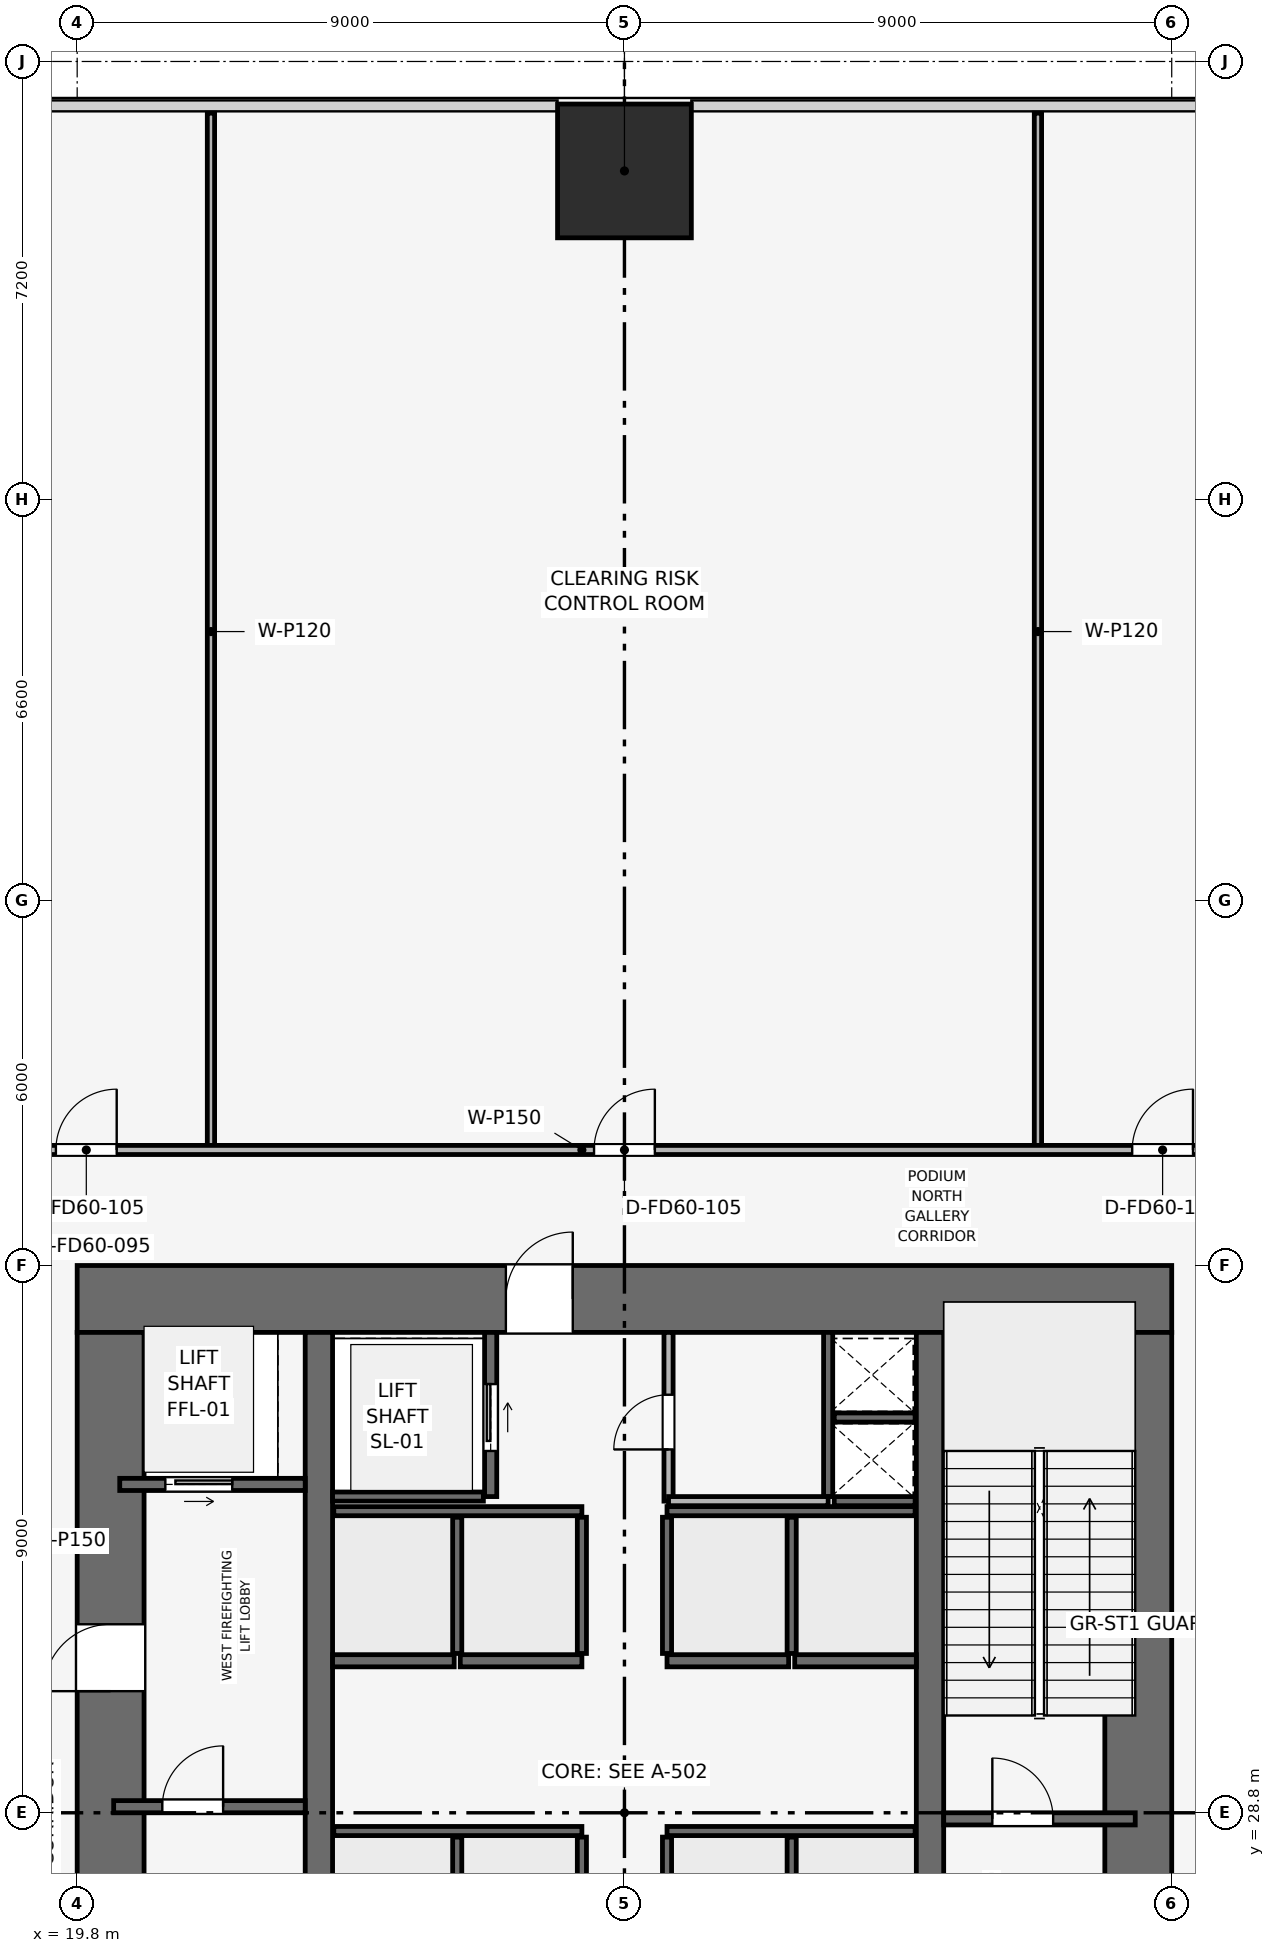
"""IFC4 building model, lengths in metres.
Left out: names, types, materials, properties, quantities, classifications, styles, units other than length and angle.
Written with IfcOpenShell. Run it as: python <this file> out.ifc"""

import sys

from ifc_helpers import new_model, si_unit, direction, frame, frame_2d, origin, origin_2d, place, context, subcontext, project, spatial, rectangle, extrude, element, fill, save


model = new_model("IFC4")
c1 = context("Model", 3, precision=1e-05, world=origin(), true_north=direction((0.0, 1.0)))
c2 = subcontext(c1, "Body", "Model", "MODEL_VIEW")
j1 = project(units=[si_unit("LENGTHUNIT", "METRE"), si_unit("PLANEANGLEUNIT", "RADIAN")], contexts=[c1])
p1 = place(None, origin())
s1 = spatial("IfcSite", under=j1, at=p1, CompositionType="ELEMENT")
p2 = place(p1, origin())
s2 = spatial("IfcBuilding", under=s1, at=p2, CompositionType="ELEMENT")
p3 = place(p2, frame((0.0, 0.0, 8.4)))
s3 = spatial("IfcBuildingStorey", under=s2, at=p3, CompositionType="ELEMENT", Elevation=8.4)
p4 = place(p3, frame((19.8, 37.25, 0.0), z_axis=(0.0, 0.0, 1.0), x_axis=(1.0, 0.0, 0.0)))
e1 = element("IfcWall", 1, at=p4, inside=s3, PredefinedType="SHEAR", context=c2, shape_type="SweptSolid", body=[
    extrude(rectangle(XDim=18.0, YDim=1.1, at=frame_2d((9.0, 0.0))), origin(), (0.0, 0.0, 1.0), 5.4),
])
p5 = place(p4, frame((7.05, 0.0, 0.0)))
e2 = element("IfcOpeningElement", 2, at=p5, cuts=e1, PredefinedType="OPENING", context=c2, shape_type="SweptSolid", body=[
    extrude(rectangle(XDim=1.1, YDim=2.15, at=frame_2d((0.55, 1.075))), frame((0.0, 0.56, 0.0), z_axis=(0.0, -1.0, 0.0), x_axis=(1.0, 0.0, 0.0)), (0.0, 0.0, 1.0), 1.12),
])
p6 = place(p3, frame((20.35, 20.9, 0.0), z_axis=(0.0, 0.0, 1.0), x_axis=(0.0, 1.0, 0.0)))
e3 = element("IfcWall", 3, at=p6, inside=s3, PredefinedType="SHEAR", context=c2, shape_type="SweptSolid", body=[
    extrude(rectangle(XDim=15.8, YDim=1.1, at=frame_2d((7.9, 0.0))), origin(), (0.0, 0.0, 1.0), 5.4),
])
p7 = place(p6, frame((9.9, 0.0, 0.0)))
e4 = element("IfcOpeningElement", 4, at=p7, cuts=e3, PredefinedType="OPENING", context=c2, shape_type="SweptSolid", body=[
    extrude(rectangle(XDim=1.1, YDim=2.15, at=frame_2d((0.55, 1.075))), frame((0.0, 0.56, 0.0), z_axis=(0.0, -1.0, 0.0), x_axis=(1.0, 0.0, 0.0)), (0.0, 0.0, 1.0), 1.12),
])
p8 = place(p3, frame((37.25, 20.9, 0.0), z_axis=(0.0, 0.0, 1.0), x_axis=(0.0, 1.0, 0.0)))
e5 = element("IfcWall", 5, at=p8, inside=s3, PredefinedType="SHEAR", context=c2, shape_type="SweptSolid", body=[
    extrude(rectangle(XDim=15.8, YDim=1.1, at=frame_2d((7.9, 0.0))), origin(), (0.0, 0.0, 1.0), 5.4),
])
p9 = place(p8, frame((4.4, 0.0, 0.0)))
e6 = element("IfcOpeningElement", 6, at=p9, cuts=e5, PredefinedType="OPENING", context=c2, shape_type="SweptSolid", body=[
    extrude(rectangle(XDim=1.1, YDim=2.15, at=frame_2d((0.55, 1.075))), frame((0.0, 0.56, 0.0), z_axis=(0.0, -1.0, 0.0), x_axis=(1.0, 0.0, 0.0)), (0.0, 0.0, 1.0), 1.12),
])
for number, where, z_axis, x_axis in (
    (7, (23.775, 20.9, 0.0), (0.0, 0.0, 1.0), (0.0, 1.0, 0.0)),
    (8, (33.825, 20.9, 0.0), (0.0, 0.0, 1.0), (0.0, 1.0, 0.0)),
):
    element("IfcWall", number, at=place(p3, frame(where, z_axis=z_axis, x_axis=x_axis)), inside=s3, PredefinedType="SHEAR", context=c2, shape_type="SweptSolid", body=[
        extrude(rectangle(XDim=15.8, YDim=0.45, at=frame_2d((7.9, 0.0))), origin(), (0.0, 0.0, 1.0), 5.4),
    ])
p10 = place(p3, frame((28.8, 55.8, 0.002), z_axis=(0.0, 0.0, 1.0), x_axis=(1.0, 0.0, 0.0)))
e9 = element("IfcColumn", 9, at=p10, inside=s3, PredefinedType="PILASTER", context=c2, shape_type="SweptSolid", body=[
    extrude(rectangle(XDim=2.2, YDim=2.2, at=origin_2d()), origin(), (0.0, 0.0, 1.0), 5.396),
])
p11 = place(p3, frame((20.4, 28.9, 0.0), z_axis=(0.0, 0.0, 1.0), x_axis=(1.0, 0.0, 0.0)))
e10 = element("IfcWall", 10, at=p11, inside=s3, PredefinedType="SHEAR", context=c2, shape_type="SweptSolid", body=[
    extrude(rectangle(XDim=3.15, YDim=0.2, at=frame_2d((1.575, 0.0))), origin(), (0.0, 0.0, 1.0), 5.05),
])
p12 = place(p11, frame((0.8, 0.0, 0.0)))
e11 = element("IfcOpeningElement", 11, at=p12, cuts=e10, PredefinedType="OPENING", context=c2, shape_type="SweptSolid", body=[
    extrude(rectangle(XDim=1.0, YDim=2.1, at=frame_2d((0.5, 1.05))), frame((0.0, 0.11, 0.0), z_axis=(0.0, -1.0, 0.0), x_axis=(1.0, 0.0, 0.0)), (0.0, 0.0, 1.0), 0.22),
])
p13 = place(p3, frame((34.05, 28.7, 0.0), z_axis=(0.0, 0.0, 1.0), x_axis=(1.0, 0.0, 0.0)))
e12 = element("IfcWall", 12, at=p13, inside=s3, PredefinedType="SHEAR", context=c2, shape_type="SweptSolid", body=[
    extrude(rectangle(XDim=3.15, YDim=0.2, at=frame_2d((1.575, 0.0))), origin(), (0.0, 0.0, 1.0), 5.05),
])
p14 = place(p13, frame((0.8, 0.0, 0.0)))
e13 = element("IfcOpeningElement", 13, at=p14, cuts=e12, PredefinedType="OPENING", context=c2, shape_type="SweptSolid", body=[
    extrude(rectangle(XDim=1.0, YDim=2.1, at=frame_2d((0.5, 1.05))), frame((0.0, 0.11, 0.0), z_axis=(0.0, -1.0, 0.0), x_axis=(1.0, 0.0, 0.0)), (0.0, 0.0, 1.0), 0.22),
])
p15 = place(p3, frame((32.15, 34.0, 0.0), z_axis=(0.0, 0.0, 1.0), x_axis=(0.0, 1.0, 0.0)))
e14 = element("IfcWall", 14, at=p15, inside=s3, PredefinedType="SHEAR", context=c2, shape_type="SweptSolid", body=[
    extrude(rectangle(XDim=2.7, YDim=0.15, at=frame_2d((1.35, 0.0))), origin(), (0.0, 0.0, 1.0), 5.05),
])
for number, where, z_axis, x_axis in (
    (15, (32.25, 33.925, 0.0), (0.0, 0.0, 1.0), (1.0, 0.0, 0.0)),
    (16, (32.25, 35.3, 0.0), (0.0, 0.0, 1.0), (1.0, 0.0, 0.0)),
):
    element("IfcWall", number, at=place(p3, frame(where, z_axis=z_axis, x_axis=x_axis)), inside=s3, PredefinedType="SHEAR", context=c2, shape_type="SweptSolid", body=[
        extrude(rectangle(XDim=1.33, YDim=0.15, at=frame_2d((0.665, 0.0))), origin(), (0.0, 0.0, 1.0), 5.05),
    ])
p16 = place(p3, frame((20.5, 34.2, 0.0), z_axis=(0.0, 0.0, 1.0), x_axis=(1.0, 0.0, 0.0)))
e17 = element("IfcWall", 17, at=p16, inside=s3, PredefinedType="SHEAR", context=c2, shape_type="SweptSolid", body=[
    extrude(rectangle(XDim=3.05, YDim=0.2, at=frame_2d((1.525, 0.0))), origin(), (0.0, 0.0, 1.0), 5.05),
])
p17 = place(p16, frame((0.75, 0.0, 0.0)))
e18 = element("IfcOpeningElement", 18, at=p17, cuts=e17, PredefinedType="OPENING", context=c2, shape_type="SweptSolid", body=[
    extrude(rectangle(XDim=1.1, YDim=2.15, at=frame_2d((0.55, 1.075))), frame((0.0, 0.11, 0.0), z_axis=(0.0, -1.0, 0.0), x_axis=(1.0, 0.0, 0.0)), (0.0, 0.0, 1.0), 0.22),
])
p18 = place(p3, frame((26.6, 34.0, 0.0), z_axis=(0.0, 0.0, 1.0), x_axis=(0.0, 1.0, 0.0)))
e19 = element("IfcWall", 19, at=p18, inside=s3, PredefinedType="SHEAR", context=c2, shape_type="SweptSolid", body=[
    extrude(rectangle(XDim=2.7, YDim=0.2, at=frame_2d((1.35, 0.0))), origin(), (0.0, 0.0, 1.0), 5.05),
])
p19 = place(p18, frame((0.75, 0.0, 0.0)))
e20 = element("IfcOpeningElement", 20, at=p19, cuts=e19, PredefinedType="OPENING", context=c2, shape_type="SweptSolid", body=[
    extrude(rectangle(XDim=1.1, YDim=2.15, at=frame_2d((0.55, 1.075))), frame((0.0, 0.11, 0.0), z_axis=(0.0, -1.0, 0.0), x_axis=(1.0, 0.0, 0.0)), (0.0, 0.0, 1.0), 0.22),
])
p20 = place(p3, frame((24.0, 34.0, 0.0), z_axis=(0.0, 0.0, 1.0), x_axis=(1.0, 0.0, 0.0)))
e21 = element("IfcWall", 21, at=p20, inside=s3, PredefinedType="SHEAR", context=c2, shape_type="SweptSolid", body=[
    extrude(rectangle(XDim=2.48, YDim=0.15, at=frame_2d((1.24, 0.0))), origin(), (0.0, 0.0, 1.0), 5.05),
])
for number, where, z_axis, x_axis in (
    (22, (24.0, 31.3, 0.0), (0.0, 0.0, 1.0), (1.0, 0.0, 0.0)),
    (23, (26.1, 31.3, 0.0), (0.0, 0.0, 1.0), (1.0, 0.0, 0.0)),
    (24, (29.5, 31.3, 0.0), (0.0, 0.0, 1.0), (1.0, 0.0, 0.0)),
    (25, (31.6, 31.3, 0.0), (0.0, 0.0, 1.0), (1.0, 0.0, 0.0)),
):
    element("IfcWall", number, at=place(p3, frame(where, z_axis=z_axis, x_axis=x_axis)), inside=s3, PredefinedType="SHEAR", context=c2, shape_type="SweptSolid", body=[
        extrude(rectangle(XDim=2.0, YDim=0.2, at=frame_2d((1.0, 0.0))), origin(), (0.0, 0.0, 1.0), 5.05),
    ])
for number, where, z_axis, x_axis in (
    (26, (24.02, 28.5, 0.0), (0.0, 0.0, 1.0), (1.0, 0.0, 0.0)),
    (27, (29.5, 28.5, 0.0), (0.0, 0.0, 1.0), (1.0, 0.0, 0.0)),
):
    element("IfcWall", number, at=place(p3, frame(where, z_axis=z_axis, x_axis=x_axis)), inside=s3, PredefinedType="SHEAR", context=c2, shape_type="SweptSolid", body=[
        extrude(rectangle(XDim=4.08, YDim=0.15, at=frame_2d((2.04, 0.0))), origin(), (0.0, 0.0, 1.0), 5.05),
    ])
for number, where, z_axis, x_axis in (
    (28, (26.05, 26.12, 0.0), (0.0, 0.0, 1.0), (0.0, 1.0, 0.0)),
    (29, (28.1, 26.12, 0.0), (0.0, 0.0, 1.0), (0.0, 1.0, 0.0)),
    (30, (29.5, 26.12, 0.0), (0.0, 0.0, 1.0), (0.0, 1.0, 0.0)),
    (31, (31.55, 26.12, 0.0), (0.0, 0.0, 1.0), (0.0, 1.0, 0.0)),
):
    element("IfcWall", number, at=place(p3, frame(where, z_axis=z_axis, x_axis=x_axis)), inside=s3, PredefinedType="SHEAR", context=c2, shape_type="SweptSolid", body=[
        extrude(rectangle(XDim=2.28, YDim=0.15, at=frame_2d((1.14, 0.0))), origin(), (0.0, 0.0, 1.0), 5.05),
    ])
for number, where, z_axis, x_axis in (
    (32, (24.02, 33.76, 0.0), (0.0, 0.0, 1.0), (1.0, 0.0, 0.0)),
    (33, (29.5, 33.76, 0.0), (0.0, 0.0, 1.0), (1.0, 0.0, 0.0)),
):
    element("IfcWall", number, at=place(p3, frame(where, z_axis=z_axis, x_axis=x_axis)), inside=s3, PredefinedType="SHEAR", context=c2, shape_type="SweptSolid", body=[
        extrude(rectangle(XDim=4.08, YDim=0.15, at=frame_2d((2.04, 0.0))), origin(), (0.0, 0.0, 1.0), 5.05),
    ])
for number, where, z_axis, x_axis in (
    (34, (26.05, 31.42, 0.0), (0.0, 0.0, 1.0), (0.0, 1.0, 0.0)),
    (35, (28.1, 31.42, 0.0), (0.0, 0.0, 1.0), (0.0, 1.0, 0.0)),
    (36, (29.5, 31.42, 0.0), (0.0, 0.0, 1.0), (0.0, 1.0, 0.0)),
    (37, (31.55, 31.42, 0.0), (0.0, 0.0, 1.0), (0.0, 1.0, 0.0)),
):
    element("IfcWall", number, at=place(p3, frame(where, z_axis=z_axis, x_axis=x_axis)), inside=s3, PredefinedType="SHEAR", context=c2, shape_type="SweptSolid", body=[
        extrude(rectangle(XDim=2.24, YDim=0.15, at=frame_2d((1.12, 0.0))), origin(), (0.0, 0.0, 1.0), 5.05),
    ])
p21 = place(p3, frame((29.525, 33.925, 0.0), z_axis=(0.0, 0.0, 1.0), x_axis=(0.0, 1.0, 0.0)))
e38 = element("IfcWall", 38, at=p21, inside=s3, PredefinedType="PARTITIONING", context=c2, shape_type="SweptSolid", body=[
    extrude(rectangle(XDim=2.775, YDim=0.15, at=frame_2d((1.387, 0.0))), origin(), (0.0, 0.0, 1.0), 5.05),
])
p22 = place(p21, frame((0.85, 0.0, 0.0)))
e39 = element("IfcOpeningElement", 39, at=p22, cuts=e38, PredefinedType="OPENING", context=c2, shape_type="SweptSolid", body=[
    extrude(rectangle(XDim=0.9, YDim=2.1, at=frame_2d((0.45, 1.05))), frame((0.0, 0.085, 0.0), z_axis=(0.0, -1.0, 0.0), x_axis=(1.0, 0.0, 0.0)), (0.0, 0.0, 1.0), 0.17),
])
p23 = place(p3, frame((29.525, 33.925, 0.0), z_axis=(0.0, 0.0, 1.0), x_axis=(1.0, 0.0, 0.0)))
e40 = element("IfcWall", 40, at=p23, inside=s3, PredefinedType="PARTITIONING", context=c2, shape_type="SweptSolid", body=[
    extrude(rectangle(XDim=2.625, YDim=0.15, at=frame_2d((1.312, 0.0))), origin(), (0.0, 0.0, 1.0), 5.05),
])
for number, where, z_axis, x_axis in (
    (41, (22.0, 39.7, 0.0), (0.0, 0.0, 1.0), (0.0, 1.0, 0.0)),
    (42, (35.6, 39.7, 0.0), (0.0, 0.0, 1.0), (0.0, 1.0, 0.0)),
):
    element("IfcWall", number, at=place(p3, frame(where, z_axis=z_axis, x_axis=x_axis)), inside=s3, PredefinedType="PARTITIONING", context=c2, shape_type="SweptSolid", body=[
        extrude(rectangle(XDim=17.05, YDim=0.12, at=frame_2d((8.525, 0.0))), origin(), (0.0, 0.0, 1.0), 4.035),
    ])
p24 = place(p3, frame((17.9, 39.7, 0.0), z_axis=(0.0, 0.0, 1.0), x_axis=(1.0, 0.0, 0.0)))
e43 = element("IfcWall", 43, at=p24, inside=s3, PredefinedType="PARTITIONING", context=c2, shape_type="SweptSolid", body=[
    extrude(rectangle(XDim=21.8, YDim=0.15, at=frame_2d((10.9, 0.0))), origin(), (0.0, 0.0, 1.0), 4.135),
])
p25 = place(p24, frame((1.55, 0.0, 0.0)))
e44 = element("IfcOpeningElement", 44, at=p25, cuts=e43, PredefinedType="OPENING", context=c2, shape_type="SweptSolid", body=[
    extrude(rectangle(XDim=1.0, YDim=2.15, at=frame_2d((0.5, 1.075))), frame((0.0, 0.085, 0.0), z_axis=(0.0, -1.0, 0.0), x_axis=(1.0, 0.0, 0.0)), (0.0, 0.0, 1.0), 0.17),
])
p26 = place(p24, frame((10.4, 0.0, 0.0)))
e45 = element("IfcOpeningElement", 45, at=p26, cuts=e43, PredefinedType="OPENING", context=c2, shape_type="SweptSolid", body=[
    extrude(rectangle(XDim=1.0, YDim=2.15, at=frame_2d((0.5, 1.075))), frame((0.0, 0.085, 0.0), z_axis=(0.0, -1.0, 0.0), x_axis=(1.0, 0.0, 0.0)), (0.0, 0.0, 1.0), 0.17),
])
p27 = place(p24, frame((19.25, 0.0, 0.0)))
e46 = element("IfcOpeningElement", 46, at=p27, cuts=e43, PredefinedType="OPENING", context=c2, shape_type="SweptSolid", body=[
    extrude(rectangle(XDim=1.0, YDim=2.15, at=frame_2d((0.5, 1.075))), frame((0.0, 0.085, 0.0), z_axis=(0.0, -1.0, 0.0), x_axis=(1.0, 0.0, 0.0)), (0.0, 0.0, 1.0), 0.17),
])
p28 = place(p12, origin())
e47 = element("IfcDoor", 47, at=p28, inside=s3, OperationType="SINGLE_SWING_RIGHT", PredefinedType="DOOR", context=c2, shape_type="SweptSolid", body=[
    extrude(rectangle(XDim=1.0, YDim=2.1, at=frame_2d((0.5, 1.05))), frame((0.0, 0.025, 0.0), z_axis=(0.0, -1.0, 0.0), x_axis=(1.0, 0.0, 0.0)), (0.0, 0.0, 1.0), 0.05),
])
fill(e11, e47)
p29 = place(p14, origin())
e48 = element("IfcDoor", 48, at=p29, inside=s3, OperationType="SINGLE_SWING_LEFT", PredefinedType="DOOR", context=c2, shape_type="SweptSolid", body=[
    extrude(rectangle(XDim=1.0, YDim=2.1, at=frame_2d((0.5, 1.05))), frame((0.0, 0.025, 0.0), z_axis=(0.0, -1.0, 0.0), x_axis=(1.0, 0.0, 0.0)), (0.0, 0.0, 1.0), 0.05),
])
fill(e13, e48)
p30 = place(p17, origin())
e49 = element("IfcDoor", 49, at=p30, inside=s3, OperationType="SLIDING_TO_RIGHT", PredefinedType="DOOR", context=c2, shape_type="SweptSolid", body=[
    extrude(rectangle(XDim=1.1, YDim=2.15, at=frame_2d((0.55, 1.075))), frame((0.0, 0.025, 0.0), z_axis=(0.0, -1.0, 0.0), x_axis=(1.0, 0.0, 0.0)), (0.0, 0.0, 1.0), 0.05),
])
fill(e18, e49)
p31 = place(p19, origin())
e50 = element("IfcDoor", 50, at=p31, inside=s3, OperationType="SLIDING_TO_RIGHT", PredefinedType="DOOR", context=c2, shape_type="SweptSolid", body=[
    extrude(rectangle(XDim=1.1, YDim=2.15, at=frame_2d((0.55, 1.075))), frame((0.0, 0.025, 0.0), z_axis=(0.0, -1.0, 0.0), x_axis=(1.0, 0.0, 0.0)), (0.0, 0.0, 1.0), 0.05),
])
fill(e20, e50)
p32 = place(p22, origin())
e51 = element("IfcDoor", 51, at=p32, inside=s3, OperationType="SINGLE_SWING_LEFT", PredefinedType="DOOR", context=c2, shape_type="SweptSolid", body=[
    extrude(rectangle(XDim=0.9, YDim=2.1, at=frame_2d((0.45, 1.05))), frame((0.0, 0.025, 0.0), z_axis=(0.0, -1.0, 0.0), x_axis=(1.0, 0.0, 0.0)), (0.0, 0.0, 1.0), 0.05),
])
fill(e39, e51)
p33 = place(p25, origin())
e52 = element("IfcDoor", 52, at=p33, inside=s3, OperationType="SINGLE_SWING_RIGHT", PredefinedType="DOOR", context=c2, shape_type="SweptSolid", body=[
    extrude(rectangle(XDim=1.0, YDim=2.15, at=frame_2d((0.5, 1.075))), frame((0.0, 0.025, 0.0), z_axis=(0.0, -1.0, 0.0), x_axis=(1.0, 0.0, 0.0)), (0.0, 0.0, 1.0), 0.05),
])
fill(e44, e52)
p34 = place(p26, origin())
e53 = element("IfcDoor", 53, at=p34, inside=s3, OperationType="SINGLE_SWING_RIGHT", PredefinedType="DOOR", context=c2, shape_type="SweptSolid", body=[
    extrude(rectangle(XDim=1.0, YDim=2.15, at=frame_2d((0.5, 1.075))), frame((0.0, 0.025, 0.0), z_axis=(0.0, -1.0, 0.0), x_axis=(1.0, 0.0, 0.0)), (0.0, 0.0, 1.0), 0.05),
])
fill(e45, e53)
p35 = place(p27, origin())
e54 = element("IfcDoor", 54, at=p35, inside=s3, OperationType="SINGLE_SWING_RIGHT", PredefinedType="DOOR", context=c2, shape_type="SweptSolid", body=[
    extrude(rectangle(XDim=1.0, YDim=2.15, at=frame_2d((0.5, 1.075))), frame((0.0, 0.025, 0.0), z_axis=(0.0, -1.0, 0.0), x_axis=(1.0, 0.0, 0.0)), (0.0, 0.0, 1.0), 0.05),
])
fill(e46, e54)
p36 = place(p7, origin())
e55 = element("IfcDoor", 55, at=p36, inside=s3, OperationType="SINGLE_SWING_LEFT", PredefinedType="DOOR", context=c2, shape_type="SweptSolid", body=[
    extrude(rectangle(XDim=1.1, YDim=2.15, at=frame_2d((0.55, 1.075))), frame((0.0, 0.025, 0.0), z_axis=(0.0, -1.0, 0.0), x_axis=(1.0, 0.0, 0.0)), (0.0, 0.0, 1.0), 0.05),
])
fill(e4, e55)
p37 = place(p5, origin())
e56 = element("IfcDoor", 56, at=p37, inside=s3, OperationType="SINGLE_SWING_RIGHT", PredefinedType="DOOR", context=c2, shape_type="SweptSolid", body=[
    extrude(rectangle(XDim=1.1, YDim=2.15, at=frame_2d((0.55, 1.075))), frame((0.0, 0.025, 0.0), z_axis=(0.0, -1.0, 0.0), x_axis=(1.0, 0.0, 0.0)), (0.0, 0.0, 1.0), 0.05),
])
fill(e2, e56)
save(model, sys.argv[1])
